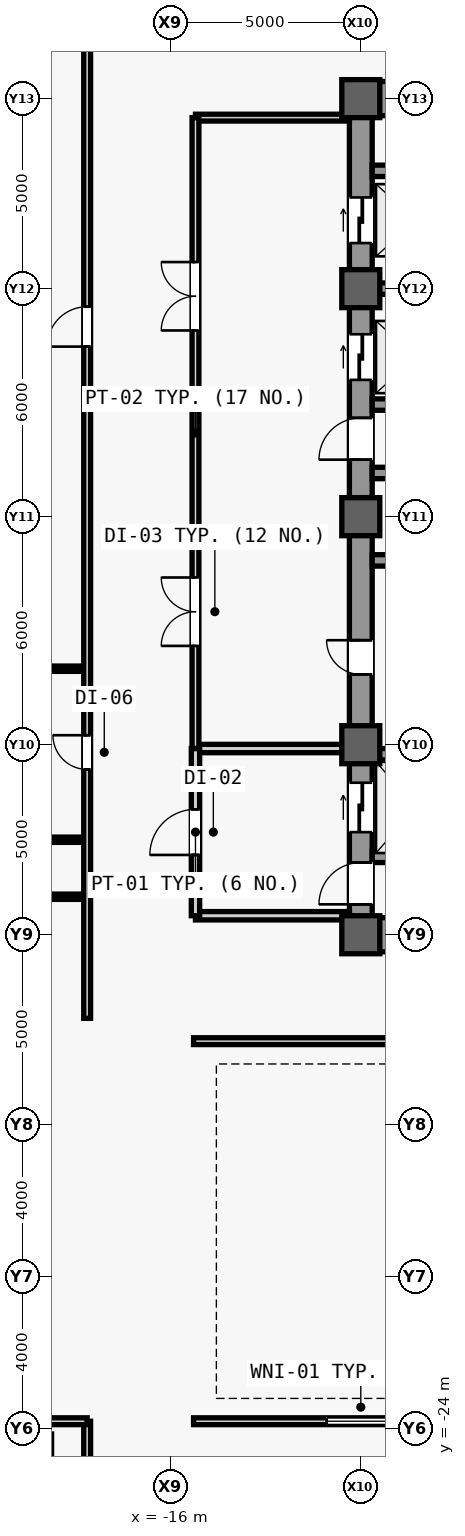
"""IFC4 building model, lengths in metres.
Left out: names, types, materials, properties, quantities, classifications, styles, units other than length and angle.
Written with IfcOpenShell. Run it as: python <this file> out.ifc"""

import sys

from ifc_helpers import new_model, si_unit, direction, frame, frame_2d, origin, origin_2d, place, context, subcontext, project, spatial, rectangle, extrude, source, transform, mapped, element, fill, save


model = new_model("IFC4")
c1 = context("Model", 3, precision=1e-05, world=origin(), true_north=direction((0.0, 1.0)))
c2 = subcontext(c1, "Body", "Model", "MODEL_VIEW")
j1 = project(units=[si_unit("LENGTHUNIT", "METRE"), si_unit("PLANEANGLEUNIT", "RADIAN")], contexts=[c1])
p1 = place(None, origin())
s1 = spatial("IfcSite", under=j1, at=p1, CompositionType="ELEMENT")
p2 = place(p1, origin())
s2 = spatial("IfcBuilding", under=s1, at=p2, CompositionType="ELEMENT")
p3 = place(p2, origin())
s3 = spatial("IfcBuildingStorey", under=s2, at=p3, CompositionType="ELEMENT", Elevation=0.0)
m1 = source(origin(), c2, "Body", "SweptSolid", [
    extrude(rectangle(XDim=22.0, YDim=0.6, at=frame_2d((11.0, 0.0))), origin(), (0.0, 0.0, 1.0), 6.28),
])
p4 = place(p3, frame((-11.0, -11.0, 0.0), z_axis=(0.0, 0.0, 1.0), x_axis=(0.0, 1.0, 0.0)))
e1 = element("IfcWall", 1, at=p4, inside=s3, PredefinedType="SHEAR", context=c2, shape_type="MappedRepresentation", body=[
    mapped(m1, transform((0.0, 0.0, 0.0), scale=1.0)),
])
m2 = source(origin(), c2, "Body", "SweptSolid", [
    extrude(rectangle(XDim=1.1, YDim=2.2, at=frame_2d((0.55, 1.1))), frame((0.0, 0.31, 0.0), z_axis=(0.0, -1.0, 0.0), x_axis=(1.0, 0.0, 0.0)), (0.0, 0.0, 1.0), 0.62),
])
p5 = place(p4, frame((0.8, 0.0, 0.0)))
e2 = element("IfcOpeningElement", 2, at=p5, cuts=e1, PredefinedType="OPENING", context=c2, shape_type="MappedRepresentation", body=[
    mapped(m2, transform((0.0, 0.0, 0.0), scale=1.0)),
])
p6 = place(p4, frame((12.5, 0.0, 0.0)))
e3 = element("IfcOpeningElement", 3, at=p6, cuts=e1, PredefinedType="OPENING", context=c2, shape_type="MappedRepresentation", body=[
    mapped(m2, transform((0.0, 0.0, 0.0), scale=1.0)),
])
m3 = source(origin(), c2, "Body", "SweptSolid", [
    extrude(rectangle(XDim=0.9, YDim=2.15, at=frame_2d((0.45, 1.075))), frame((0.0, 0.31, 0.0), z_axis=(0.0, -1.0, 0.0), x_axis=(1.0, 0.0, 0.0)), (0.0, 0.0, 1.0), 0.62),
])
p7 = place(p4, frame((6.85, 0.0, 0.0)))
e4 = element("IfcOpeningElement", 4, at=p7, cuts=e1, PredefinedType="OPENING", context=c2, shape_type="MappedRepresentation", body=[
    mapped(m3, transform((0.0, 0.0, 0.0), scale=1.0)),
])
m4 = source(origin(), c2, "Body", "SweptSolid", [
    extrude(rectangle(XDim=1.2, YDim=2.3, at=frame_2d((0.6, 1.15))), frame((0.0, 0.31, 0.0), z_axis=(0.0, -1.0, 0.0), x_axis=(1.0, 0.0, 0.0)), (0.0, 0.0, 1.0), 0.62),
])
p8 = place(p4, frame((14.6, 0.0, 0.0)))
e5 = element("IfcOpeningElement", 5, at=p8, cuts=e1, PredefinedType="OPENING", context=c2, shape_type="MappedRepresentation", body=[
    mapped(m4, transform((0.0, 0.0, 0.0), scale=1.0)),
])
p9 = place(p4, frame((18.2, 0.0, 0.0)))
e6 = element("IfcOpeningElement", 6, at=p9, cuts=e1, PredefinedType="OPENING", context=c2, shape_type="MappedRepresentation", body=[
    mapped(m4, transform((0.0, 0.0, 0.0), scale=1.0)),
])
m5 = source(origin(), c2, "Body", "SweptSolid", [
    extrude(rectangle(XDim=1.3, YDim=2.3, at=frame_2d((0.65, 1.15))), frame((0.0, 0.31, 0.0), z_axis=(0.0, -1.0, 0.0), x_axis=(1.0, 0.0, 0.0)), (0.0, 0.0, 1.0), 0.62),
])
p10 = place(p4, frame((2.7, 0.0, 0.0)))
e7 = element("IfcOpeningElement", 7, at=p10, cuts=e1, PredefinedType="OPENING", context=c2, shape_type="MappedRepresentation", body=[
    mapped(m5, transform((0.0, 0.0, 0.0), scale=1.0)),
])
m6 = source(origin(), c2, "Body", "SweptSolid", [
    extrude(rectangle(XDim=5.85, YDim=0.9, at=frame_2d((2.925, 0.0))), origin(), (0.0, 0.0, 1.0), 6.28),
])
for number, where, z_axis, x_axis in (
    (8, (-10.7, -11.0, 0.0), (0.0, 0.0, 1.0), (1.0, 0.0, 0.0)),
    (9, (-10.7, 11.0, 0.0), (0.0, 0.0, 1.0), (1.0, 0.0, 0.0)),
):
    element("IfcWall", number, at=place(p3, frame(where, z_axis=z_axis, x_axis=x_axis)), inside=s3, PredefinedType="SHEAR", context=c2, shape_type="MappedRepresentation", body=[
        mapped(m6, transform((0.0, 0.0, 0.0), scale=1.0)),
    ])
m7 = source(origin(), c2, "Body", "SweptSolid", [
    extrude(rectangle(XDim=5.6, YDim=0.3, at=frame_2d((2.8, 0.0))), origin(), (0.0, 0.0, 1.0), 6.28),
])
for number, where, z_axis, x_axis in (
    (10, (-10.7, -1.15, 0.0), (0.0, 0.0, 1.0), (1.0, 0.0, 0.0)),
    (11, (-10.7, 1.15, 0.0), (0.0, 0.0, 1.0), (1.0, 0.0, 0.0)),
):
    element("IfcWall", number, at=place(p3, frame(where, z_axis=z_axis, x_axis=x_axis)), inside=s3, PredefinedType="SHEAR", context=c2, shape_type="MappedRepresentation", body=[
        mapped(m7, transform((0.0, 0.0, 0.0), scale=1.0)),
    ])
m8 = source(origin(), c2, "Body", "SweptSolid", [
    extrude(rectangle(XDim=1.0, YDim=1.0, at=origin_2d()), origin(), (0.0, 0.0, 1.0), 6.6),
])
for number, where, z_axis, x_axis in (
    (12, (-11.0, -11.0, 0.0), (0.0, 0.0, 1.0), (1.0, 0.0, 0.0)),
    (13, (-11.0, -6.0, 0.0), (0.0, 0.0, 1.0), (1.0, 0.0, 0.0)),
    (14, (-11.0, 0.0, 0.0), (0.0, 0.0, 1.0), (1.0, 0.0, 0.0)),
    (15, (-11.0, 6.0, 0.0), (0.0, 0.0, 1.0), (1.0, 0.0, 0.0)),
    (16, (-11.0, 11.0, 0.0), (0.0, 0.0, 1.0), (1.0, 0.0, 0.0)),
):
    element("IfcColumn", number, at=place(p3, frame(where, z_axis=z_axis, x_axis=x_axis)), inside=s3, PredefinedType="COLUMN", context=c2, shape_type="MappedRepresentation", body=[
        mapped(m8, transform((0.0, 0.0, 0.0), scale=1.0)),
    ])
m9 = source(origin(), c2, "Body", "SweptSolid", [
    extrude(rectangle(XDim=2.2, YDim=0.3, at=frame_2d((1.1, 0.0))), origin(), (0.0, 0.0, 1.0), 6.28),
])
for number, where, z_axis, x_axis in (
    (17, (-10.7, -8.95, 0.0), (0.0, 0.0, 1.0), (1.0, 0.0, 0.0)),
    (18, (-10.7, -6.25, 0.0), (0.0, 0.0, 1.0), (1.0, 0.0, 0.0)),
    (19, (-10.7, 2.95, 0.0), (0.0, 0.0, 1.0), (1.0, 0.0, 0.0)),
    (20, (-10.7, 6.0, 0.0), (0.0, 0.0, 1.0), (1.0, 0.0, 0.0)),
    (21, (-10.7, 9.1, 0.0), (0.0, 0.0, 1.0), (1.0, 0.0, 0.0)),
):
    element("IfcWall", number, at=place(p3, frame(where, z_axis=z_axis, x_axis=x_axis)), inside=s3, PredefinedType="SHEAR", context=c2, shape_type="MappedRepresentation", body=[
        mapped(m9, transform((0.0, 0.0, 0.0), scale=1.0)),
    ])
m10 = source(origin(), c2, "Body", "SweptSolid", [
    extrude(rectangle(XDim=4.05, YDim=0.22, at=frame_2d((2.025, 0.0))), origin(), (0.0, 0.0, 1.0), 6.28),
])
for number, where, z_axis, x_axis in (
    (22, (-15.35, -10.5, 0.0), (0.0, 0.0, 1.0), (1.0, 0.0, 0.0)),
    (23, (-15.35, -6.1, 0.0), (0.0, 0.0, 1.0), (1.0, 0.0, 0.0)),
):
    element("IfcWall", number, at=place(p3, frame(where, z_axis=z_axis, x_axis=x_axis)), inside=s3, PredefinedType="PARTITIONING", context=c2, shape_type="MappedRepresentation", body=[
        mapped(m10, transform((0.0, 0.0, 0.0), scale=1.0)),
    ])
m11 = source(origin(), c2, "Body", "SweptSolid", [
    extrude(rectangle(XDim=4.4, YDim=0.22, at=frame_2d((2.2, 0.0))), origin(), (0.0, 0.0, 1.0), 6.28),
])
p11 = place(p3, frame((-15.35, -10.5, 0.0), z_axis=(0.0, 0.0, 1.0), x_axis=(0.0, 1.0, 0.0)))
e24 = element("IfcWall", 24, at=p11, inside=s3, PredefinedType="PARTITIONING", context=c2, shape_type="MappedRepresentation", body=[
    mapped(m11, transform((0.0, 0.0, 0.0), scale=1.0)),
])
m12 = source(origin(), c2, "Body", "SweptSolid", [
    extrude(rectangle(XDim=1.2, YDim=2.2, at=frame_2d((0.6, 1.1))), frame((0.0, 0.12, 0.0), z_axis=(0.0, -1.0, 0.0), x_axis=(1.0, 0.0, 0.0)), (0.0, 0.0, 1.0), 0.24),
])
p12 = place(p11, frame((1.6, 0.0, 0.0)))
e25 = element("IfcOpeningElement", 25, at=p12, cuts=e24, PredefinedType="OPENING", context=c2, shape_type="MappedRepresentation", body=[
    mapped(m12, transform((0.0, 0.0, 0.0), scale=1.0)),
])
m13 = source(origin(), c2, "Body", "SweptSolid", [
    extrude(rectangle(XDim=4.05, YDim=0.18, at=frame_2d((2.025, 0.0))), origin(), (0.0, 0.0, 1.0), 6.28),
])
p13 = place(p3, frame((-15.35, 10.5, 0.0), z_axis=(0.0, 0.0, 1.0), x_axis=(1.0, 0.0, 0.0)))
e26 = element("IfcWall", 26, at=p13, inside=s3, PredefinedType="PARTITIONING", context=c2, shape_type="MappedRepresentation", body=[
    mapped(m13, transform((0.0, 0.0, 0.0), scale=1.0)),
])
m14 = source(origin(), c2, "Body", "SweptSolid", [
    extrude(rectangle(XDim=16.6, YDim=0.18, at=frame_2d((8.3, 0.0))), origin(), (0.0, 0.0, 1.0), 6.28),
])
p14 = place(p3, frame((-15.35, -6.1, 0.0), z_axis=(0.0, 0.0, 1.0), x_axis=(0.0, 1.0, 0.0)))
e27 = element("IfcWall", 27, at=p14, inside=s3, PredefinedType="PARTITIONING", context=c2, shape_type="MappedRepresentation", body=[
    mapped(m14, transform((0.0, 0.0, 0.0), scale=1.0)),
])
m15 = source(origin(), c2, "Body", "SweptSolid", [
    extrude(rectangle(XDim=1.8, YDim=2.25, at=frame_2d((0.9, 1.125))), frame((0.0, 0.1, 0.0), z_axis=(0.0, -1.0, 0.0), x_axis=(1.0, 0.0, 0.0)), (0.0, 0.0, 1.0), 0.2),
])
p15 = place(p14, frame((2.7, 0.0, 0.0)))
e28 = element("IfcOpeningElement", 28, at=p15, cuts=e27, PredefinedType="OPENING", context=c2, shape_type="MappedRepresentation", body=[
    mapped(m15, transform((0.0, 0.0, 0.0), scale=1.0)),
])
p16 = place(p14, frame((11.0, 0.0, 0.0)))
e29 = element("IfcOpeningElement", 29, at=p16, cuts=e27, PredefinedType="OPENING", context=c2, shape_type="MappedRepresentation", body=[
    mapped(m15, transform((0.0, 0.0, 0.0), scale=1.0)),
])
m16 = source(origin(), c2, "Body", "SweptSolid", [
    extrude(rectangle(XDim=30.8, YDim=0.18, at=frame_2d((15.4, 0.0))), origin(), (0.0, 0.0, 1.0), 4.08),
])
p17 = place(p3, frame((-15.4, -23.8, 0.0), z_axis=(0.0, 0.0, 1.0), x_axis=(1.0, 0.0, 0.0)))
e30 = element("IfcWall", 30, at=p17, inside=s3, PredefinedType="PARTITIONING", context=c2, shape_type="MappedRepresentation", body=[
    mapped(m16, transform((0.0, 0.0, 0.0), scale=1.0)),
])
p18 = place(p17, frame((8.5, 0.0, 0.0)))
e31 = element("IfcOpeningElement", 31, at=p18, cuts=e30, PredefinedType="OPENING", context=c2, shape_type="MappedRepresentation", body=[
    mapped(m15, transform((0.0, 0.0, 0.0), scale=1.0)),
])
p19 = place(p17, frame((20.5, 0.0, 0.0)))
e32 = element("IfcOpeningElement", 32, at=p19, cuts=e30, PredefinedType="OPENING", context=c2, shape_type="MappedRepresentation", body=[
    mapped(m15, transform((0.0, 0.0, 0.0), scale=1.0)),
])
m17 = source(origin(), c2, "Body", "SweptSolid", [
    extrude(rectangle(XDim=1.8, YDim=1.4, at=frame_2d((0.9, 0.7))), frame((0.0, 0.1, 0.0), z_axis=(0.0, -1.0, 0.0), x_axis=(1.0, 0.0, 0.0)), (0.0, 0.0, 1.0), 0.2),
])
p20 = place(p17, frame((3.5, 0.0, 0.9)))
e33 = element("IfcOpeningElement", 33, at=p20, cuts=e30, PredefinedType="OPENING", context=c2, shape_type="MappedRepresentation", body=[
    mapped(m17, transform((0.0, 0.0, 0.0), scale=1.0)),
])
p21 = place(p17, frame((23.7, 0.0, 0.9)))
e34 = element("IfcOpeningElement", 34, at=p21, cuts=e30, PredefinedType="OPENING", context=c2, shape_type="MappedRepresentation", body=[
    mapped(m17, transform((0.0, 0.0, 0.0), scale=1.0)),
])
m18 = source(origin(), c2, "Body", "SweptSolid", [
    extrude(rectangle(XDim=30.8, YDim=0.18, at=frame_2d((15.4, 0.0))), origin(), (0.0, 0.0, 1.0), 6.28),
])
p22 = place(p3, frame((-15.4, -13.8, 0.0), z_axis=(0.0, 0.0, 1.0), x_axis=(1.0, 0.0, 0.0)))
e35 = element("IfcWall", 35, at=p22, inside=s3, PredefinedType="PARTITIONING", context=c2, shape_type="MappedRepresentation", body=[
    mapped(m18, transform((0.0, 0.0, 0.0), scale=1.0)),
])
p23 = place(p22, frame((14.5, 0.0, 0.0)))
e36 = element("IfcOpeningElement", 36, at=p23, cuts=e35, PredefinedType="OPENING", context=c2, shape_type="MappedRepresentation", body=[
    mapped(m15, transform((0.0, 0.0, 0.0), scale=1.0)),
])
m19 = source(origin(), c2, "Body", "SweptSolid", [
    extrude(rectangle(XDim=4.5, YDim=0.18, at=frame_2d((2.25, 0.0))), origin(), (0.0, 0.0, 1.0), 6.28),
])
p24 = place(p3, frame((-18.2, -28.3, 0.0), z_axis=(0.0, 0.0, 1.0), x_axis=(0.0, 1.0, 0.0)))
e37 = element("IfcWall", 37, at=p24, inside=s3, PredefinedType="PARTITIONING", context=c2, shape_type="MappedRepresentation", body=[
    mapped(m19, transform((0.0, 0.0, 0.0), scale=1.0)),
])
p25 = place(p24, frame((1.4, 0.0, 0.0)))
e38 = element("IfcOpeningElement", 38, at=p25, cuts=e37, PredefinedType="OPENING", context=c2, shape_type="MappedRepresentation", body=[
    mapped(m15, transform((0.0, 0.0, 0.0), scale=1.0)),
])
m20 = source(origin(), c2, "Body", "SweptSolid", [
    extrude(rectangle(XDim=7.3, YDim=0.18, at=frame_2d((3.65, 0.0))), origin(), (0.0, 0.0, 1.0), 4.08),
])
p26 = place(p3, frame((-25.5, -23.8, 0.0), z_axis=(0.0, 0.0, 1.0), x_axis=(1.0, 0.0, 0.0)))
e39 = element("IfcWall", 39, at=p26, inside=s3, PredefinedType="PARTITIONING", context=c2, shape_type="MappedRepresentation", body=[
    mapped(m20, transform((0.0, 0.0, 0.0), scale=1.0)),
])
p27 = place(p26, frame((4.4, 0.0, 0.0)))
e40 = element("IfcOpeningElement", 40, at=p27, cuts=e39, PredefinedType="OPENING", context=c2, shape_type="MappedRepresentation", body=[
    mapped(m15, transform((0.0, 0.0, 0.0), scale=1.0)),
])
m21 = source(origin(), c2, "Body", "SweptSolid", [
    extrude(rectangle(XDim=27.8, YDim=0.14, at=frame_2d((13.9, 0.0))), origin(), (0.0, 0.0, 1.0), 6.28),
])
p28 = place(p3, frame((-46.0, -4.0, 0.0), z_axis=(0.0, 0.0, 1.0), x_axis=(1.0, 0.0, 0.0)))
e41 = element("IfcWall", 41, at=p28, inside=s3, PredefinedType="PARTITIONING", context=c2, shape_type="MappedRepresentation", body=[
    mapped(m21, transform((0.0, 0.0, 0.0), scale=1.0)),
])
m22 = source(origin(), c2, "Body", "SweptSolid", [
    extrude(rectangle(XDim=11.8, YDim=0.14, at=frame_2d((5.9, 0.0))), origin(), (0.0, 0.0, 1.0), 6.28),
])
p29 = place(p3, frame((-30.0, -10.0, 0.0), z_axis=(0.0, 0.0, 1.0), x_axis=(1.0, 0.0, 0.0)))
e42 = element("IfcWall", 42, at=p29, inside=s3, PredefinedType="PARTITIONING", context=c2, shape_type="MappedRepresentation", body=[
    mapped(m22, transform((0.0, 0.0, 0.0), scale=1.0)),
])
m23 = source(origin(), c2, "Body", "SweptSolid", [
    extrude(rectangle(XDim=4.0, YDim=0.14, at=frame_2d((2.0, 0.0))), origin(), (0.0, 0.0, 1.0), 6.28),
])
p30 = place(p3, frame((-22.2, -8.5, 0.0), z_axis=(0.0, 0.0, 1.0), x_axis=(1.0, 0.0, 0.0)))
e43 = element("IfcWall", 43, at=p30, inside=s3, PredefinedType="PARTITIONING", context=c2, shape_type="MappedRepresentation", body=[
    mapped(m23, transform((0.0, 0.0, 0.0), scale=1.0)),
])
m24 = source(origin(), c2, "Body", "SweptSolid", [
    extrude(rectangle(XDim=27.0, YDim=0.18, at=frame_2d((13.5, 0.0))), origin(), (0.0, 0.0, 1.0), 6.28),
])
p31 = place(p3, frame((-18.2, -13.2, 0.0), z_axis=(0.0, 0.0, 1.0), x_axis=(0.0, 1.0, 0.0)))
e44 = element("IfcWall", 44, at=p31, inside=s3, PredefinedType="PARTITIONING", context=c2, shape_type="MappedRepresentation", body=[
    mapped(m24, transform((0.0, 0.0, 0.0), scale=1.0)),
])
m25 = source(origin(), c2, "Body", "SweptSolid", [
    extrude(rectangle(XDim=0.9, YDim=2.15, at=frame_2d((0.45, 1.075))), frame((0.0, 0.1, 0.0), z_axis=(0.0, -1.0, 0.0), x_axis=(1.0, 0.0, 0.0)), (0.0, 0.0, 1.0), 0.2),
])
p32 = place(p31, frame((6.55, 0.0, 0.0)))
e45 = element("IfcOpeningElement", 45, at=p32, cuts=e44, PredefinedType="OPENING", context=c2, shape_type="MappedRepresentation", body=[
    mapped(m25, transform((0.0, 0.0, 0.0), scale=1.0)),
])
m26 = source(origin(), c2, "Body", "SweptSolid", [
    extrude(rectangle(XDim=1.05, YDim=2.2, at=frame_2d((0.525, 1.1))), frame((0.0, 0.1, 0.0), z_axis=(0.0, -1.0, 0.0), x_axis=(1.0, 0.0, 0.0)), (0.0, 0.0, 1.0), 0.2),
])
p33 = place(p31, frame((17.675, 0.0, 0.0)))
e46 = element("IfcOpeningElement", 46, at=p33, cuts=e44, PredefinedType="OPENING", context=c2, shape_type="MappedRepresentation", body=[
    mapped(m26, transform((0.0, 0.0, 0.0), scale=1.0)),
])
m27 = source(origin(), c2, "Body", "SweptSolid", [
    extrude(rectangle(XDim=1.1, YDim=2.2, at=frame_2d((0.55, 1.1))), frame((0.0, 0.025, 0.0), z_axis=(0.0, -1.0, 0.0), x_axis=(1.0, 0.0, 0.0)), (0.0, 0.0, 1.0), 0.05),
])
p34 = place(p5, origin())
e47 = element("IfcDoor", 47, at=p34, inside=s3, OperationType="SINGLE_SWING_LEFT", PredefinedType="DOOR", context=c2, shape_type="MappedRepresentation", body=[
    mapped(m27, transform((0.0, 0.0, 0.0), scale=1.0)),
])
fill(e2, e47)
p35 = place(p6, origin())
e48 = element("IfcDoor", 48, at=p35, inside=s3, OperationType="SINGLE_SWING_LEFT", PredefinedType="DOOR", context=c2, shape_type="MappedRepresentation", body=[
    mapped(m27, transform((0.0, 0.0, 0.0), scale=1.0)),
])
fill(e3, e48)
m28 = source(origin(), c2, "Body", "SweptSolid", [
    extrude(rectangle(XDim=0.9, YDim=2.15, at=frame_2d((0.45, 1.075))), frame((0.0, 0.025, 0.0), z_axis=(0.0, -1.0, 0.0), x_axis=(1.0, 0.0, 0.0)), (0.0, 0.0, 1.0), 0.05),
])
p36 = place(p7, origin())
e49 = element("IfcDoor", 49, at=p36, inside=s3, OperationType="SINGLE_SWING_RIGHT", PredefinedType="DOOR", context=c2, shape_type="MappedRepresentation", body=[
    mapped(m28, transform((0.0, 0.0, 0.0), scale=1.0)),
])
fill(e4, e49)
m29 = source(origin(), c2, "Body", "SweptSolid", [
    extrude(rectangle(XDim=1.2, YDim=2.2, at=frame_2d((0.6, 1.1))), frame((0.0, 0.025, 0.0), z_axis=(0.0, -1.0, 0.0), x_axis=(1.0, 0.0, 0.0)), (0.0, 0.0, 1.0), 0.05),
])
p37 = place(p12, origin())
e50 = element("IfcDoor", 50, at=p37, inside=s3, OperationType="SINGLE_SWING_LEFT", PredefinedType="DOOR", context=c2, shape_type="MappedRepresentation", body=[
    mapped(m29, transform((0.0, 0.0, 0.0), scale=1.0)),
])
fill(e25, e50)
m30 = source(origin(), c2, "Body", "SweptSolid", [
    extrude(rectangle(XDim=1.8, YDim=2.25, at=frame_2d((0.9, 1.125))), frame((0.0, 0.025, 0.0), z_axis=(0.0, -1.0, 0.0), x_axis=(1.0, 0.0, 0.0)), (0.0, 0.0, 1.0), 0.05),
])
p38 = place(p15, origin())
e51 = element("IfcDoor", 51, at=p38, inside=s3, OperationType="SINGLE_SWING_LEFT", PredefinedType="DOOR", context=c2, shape_type="MappedRepresentation", body=[
    mapped(m30, transform((0.0, 0.0, 0.0), scale=1.0)),
])
fill(e28, e51)
p39 = place(p16, origin())
e52 = element("IfcDoor", 52, at=p39, inside=s3, OperationType="SINGLE_SWING_RIGHT", PredefinedType="DOOR", context=c2, shape_type="MappedRepresentation", body=[
    mapped(m30, transform((0.0, 0.0, 0.0), scale=1.0)),
])
fill(e29, e52)
p40 = place(p32, origin())
e53 = element("IfcDoor", 53, at=p40, inside=s3, OperationType="SINGLE_SWING_RIGHT", PredefinedType="DOOR", context=c2, shape_type="MappedRepresentation", body=[
    mapped(m28, transform((0.0, 0.0, 0.0), scale=1.0)),
])
fill(e45, e53)
m31 = source(origin(), c2, "Body", "SweptSolid", [
    extrude(rectangle(XDim=1.05, YDim=2.2, at=frame_2d((0.525, 1.1))), frame((0.0, 0.025, 0.0), z_axis=(0.0, -1.0, 0.0), x_axis=(1.0, 0.0, 0.0)), (0.0, 0.0, 1.0), 0.05),
])
p41 = place(p33, origin())
e54 = element("IfcDoor", 54, at=p41, inside=s3, OperationType="SINGLE_SWING_LEFT", PredefinedType="DOOR", context=c2, shape_type="MappedRepresentation", body=[
    mapped(m31, transform((0.0, 0.0, 0.0), scale=1.0)),
])
fill(e46, e54)
m32 = source(origin(), c2, "Body", "SweptSolid", [
    extrude(rectangle(XDim=1.8, YDim=1.4, at=frame_2d((0.9, 0.7))), frame((0.0, 0.03, 0.0), z_axis=(0.0, -1.0, 0.0), x_axis=(1.0, 0.0, 0.0)), (0.0, 0.0, 1.0), 0.06),
])
p42 = place(p20, origin())
e55 = element("IfcWindow", 55, at=p42, inside=s3, PartitioningType="SINGLE_PANEL", PredefinedType="WINDOW", context=c2, shape_type="MappedRepresentation", body=[
    mapped(m32, transform((0.0, 0.0, 0.0), scale=1.0)),
])
fill(e33, e55)
m33 = source(origin(), c2, "Body", "SweptSolid", [
    extrude(rectangle(XDim=1.2, YDim=2.3, at=frame_2d((0.6, 1.15))), frame((0.0, 0.025, 0.0), z_axis=(0.0, -1.0, 0.0), x_axis=(1.0, 0.0, 0.0)), (0.0, 0.0, 1.0), 0.05),
])
p43 = place(p8, origin())
e56 = element("IfcDoor", 56, at=p43, inside=s3, OperationType="SLIDING_TO_LEFT", PredefinedType="DOOR", context=c2, shape_type="MappedRepresentation", body=[
    mapped(m33, transform((0.0, 0.0, 0.0), scale=1.0)),
])
fill(e5, e56)
p44 = place(p9, origin())
e57 = element("IfcDoor", 57, at=p44, inside=s3, OperationType="SLIDING_TO_LEFT", PredefinedType="DOOR", context=c2, shape_type="MappedRepresentation", body=[
    mapped(m33, transform((0.0, 0.0, 0.0), scale=1.0)),
])
fill(e6, e57)
m34 = source(origin(), c2, "Body", "SweptSolid", [
    extrude(rectangle(XDim=1.3, YDim=2.3, at=frame_2d((0.65, 1.15))), frame((0.0, 0.025, 0.0), z_axis=(0.0, -1.0, 0.0), x_axis=(1.0, 0.0, 0.0)), (0.0, 0.0, 1.0), 0.05),
])
p45 = place(p10, origin())
e58 = element("IfcDoor", 58, at=p45, inside=s3, OperationType="SLIDING_TO_LEFT", PredefinedType="DOOR", context=c2, shape_type="MappedRepresentation", body=[
    mapped(m34, transform((0.0, 0.0, 0.0), scale=1.0)),
])
fill(e7, e58)
save(model, sys.argv[1])
